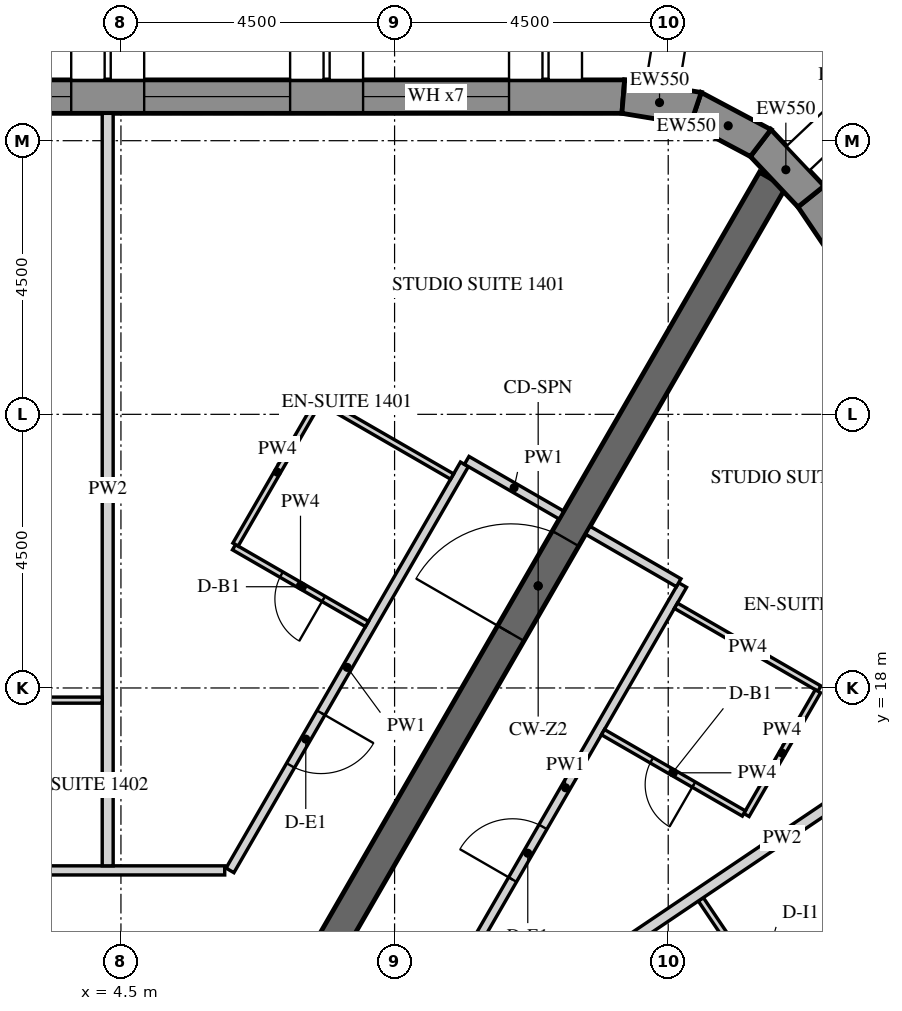
"""IFC4 building model, lengths in metres.
Left out: names, types, materials, properties, quantities, classifications, styles, units other than length and angle.
Written with IfcOpenShell. Run it as: python <this file> out.ifc"""

import sys

from ifc_helpers import new_model, si_unit, direction, frame, frame_2d, origin, place, context, subcontext, project, spatial, polyline, rectangle, outline, extrude, element, fill, save


model = new_model("IFC4")
c1 = context("Model", 3, precision=1e-05, world=origin(), true_north=direction((0.0, 1.0)))
c2 = subcontext(c1, "Body", "Model", "MODEL_VIEW")
j1 = project(units=[si_unit("LENGTHUNIT", "METRE"), si_unit("PLANEANGLEUNIT", "RADIAN")], contexts=[c1])
p1 = place(None, origin())
s1 = spatial("IfcSite", under=j1, at=p1, CompositionType="ELEMENT")
p2 = place(p1, origin())
s2 = spatial("IfcBuilding", under=s1, at=p2, CompositionType="ELEMENT")
p3 = place(p2, frame((0.0, 0.0, 183.9)))
s3 = spatial("IfcBuildingStorey", under=s2, at=p3, CompositionType="ELEMENT", Elevation=183.9)
p4 = place(p3, frame((12.761, 27.725, -0.15), z_axis=(0.0, 0.0, 1.0), x_axis=(-1.0, 0.0, 0.0)))
e1 = element("IfcWall", 1, at=p4, inside=s3, PredefinedType="SOLIDWALL", context=c2, shape_type="SweptSolid", body=[
    extrude(outline(polyline([(-0.022, -0.275), (27.783, -0.275), (27.732, 0.275), (0.022, 0.275), (-0.022, -0.275)])), origin(), (0.0, 0.0, 1.0), 3.9),
])
p5 = place(p4, frame((1.879, 0.0, 1.05)))
e2 = element("IfcOpeningElement", 2, at=p5, cuts=e1, PredefinedType="OPENING", context=c2, shape_type="SweptSolid", body=[
    extrude(rectangle(XDim=2.4, YDim=2.4, at=frame_2d((1.2, 1.2))), frame((0.0, 0.285, 0.0), z_axis=(0.0, -1.0, 0.0), x_axis=(1.0, 0.0, 0.0)), (0.0, 0.0, 1.0), 0.57),
])
p6 = place(p4, frame((5.479, 0.0, 1.05)))
e3 = element("IfcOpeningElement", 3, at=p6, cuts=e1, PredefinedType="OPENING", context=c2, shape_type="SweptSolid", body=[
    extrude(rectangle(XDim=2.4, YDim=2.4, at=frame_2d((1.2, 1.2))), frame((0.0, 0.285, 0.0), z_axis=(0.0, -1.0, 0.0), x_axis=(1.0, 0.0, 0.0)), (0.0, 0.0, 1.0), 0.57),
])
p7 = place(p4, frame((9.079, 0.0, 1.05)))
e4 = element("IfcOpeningElement", 4, at=p7, cuts=e1, PredefinedType="OPENING", context=c2, shape_type="SweptSolid", body=[
    extrude(rectangle(XDim=2.4, YDim=2.4, at=frame_2d((1.2, 1.2))), frame((0.0, 0.285, 0.0), z_axis=(0.0, -1.0, 0.0), x_axis=(1.0, 0.0, 0.0)), (0.0, 0.0, 1.0), 0.57),
])
p8 = place(p4, frame((12.679, 0.0, 1.05)))
e5 = element("IfcOpeningElement", 5, at=p8, cuts=e1, PredefinedType="OPENING", context=c2, shape_type="SweptSolid", body=[
    extrude(rectangle(XDim=2.4, YDim=2.4, at=frame_2d((1.2, 1.2))), frame((0.0, 0.285, 0.0), z_axis=(0.0, -1.0, 0.0), x_axis=(1.0, 0.0, 0.0)), (0.0, 0.0, 1.0), 0.57),
])
p9 = place(p4, frame((16.279, 0.0, 1.05)))
e6 = element("IfcOpeningElement", 6, at=p9, cuts=e1, PredefinedType="OPENING", context=c2, shape_type="SweptSolid", body=[
    extrude(rectangle(XDim=2.4, YDim=2.4, at=frame_2d((1.2, 1.2))), frame((0.0, 0.285, 0.0), z_axis=(0.0, -1.0, 0.0), x_axis=(1.0, 0.0, 0.0)), (0.0, 0.0, 1.0), 0.57),
])
p10 = place(p4, frame((19.879, 0.0, 1.05)))
e7 = element("IfcOpeningElement", 7, at=p10, cuts=e1, PredefinedType="OPENING", context=c2, shape_type="SweptSolid", body=[
    extrude(rectangle(XDim=2.4, YDim=2.4, at=frame_2d((1.2, 1.2))), frame((0.0, 0.285, 0.0), z_axis=(0.0, -1.0, 0.0), x_axis=(1.0, 0.0, 0.0)), (0.0, 0.0, 1.0), 0.57),
])
p11 = place(p4, frame((23.479, 0.0, 1.05)))
e8 = element("IfcOpeningElement", 8, at=p11, cuts=e1, PredefinedType="OPENING", context=c2, shape_type="SweptSolid", body=[
    extrude(rectangle(XDim=2.4, YDim=2.4, at=frame_2d((1.2, 1.2))), frame((0.0, 0.285, 0.0), z_axis=(0.0, -1.0, 0.0), x_axis=(1.0, 0.0, 0.0)), (0.0, 0.0, 1.0), 0.57),
])
p12 = place(p3, frame((31.371, 3.071, -0.15), z_axis=(0.0, 0.0, 1.0), x_axis=(-0.559189891278, 0.829039604297, 0.0)))
e9 = element("IfcWall", 9, at=p12, inside=s3, PredefinedType="SOLIDWALL", context=c2, shape_type="SweptSolid", body=[
    extrude(outline(polyline([(-0.026, -0.275), (27.781, -0.275), (27.736, 0.275), (0.026, 0.275), (-0.026, -0.275)])), origin(), (0.0, 0.0, 1.0), 3.9),
])
p13 = place(p12, frame((1.879, 0.0, 1.05)))
e10 = element("IfcOpeningElement", 10, at=p13, cuts=e9, PredefinedType="OPENING", context=c2, shape_type="SweptSolid", body=[
    extrude(rectangle(XDim=2.4, YDim=2.4, at=frame_2d((1.2, 1.2))), frame((0.0, 0.285, 0.0), z_axis=(0.0, -1.0, 0.0), x_axis=(1.0, 0.0, 0.0)), (0.0, 0.0, 1.0), 0.57),
])
p14 = place(p12, frame((5.479, 0.0, 1.05)))
e11 = element("IfcOpeningElement", 11, at=p14, cuts=e9, PredefinedType="OPENING", context=c2, shape_type="SweptSolid", body=[
    extrude(rectangle(XDim=2.4, YDim=2.4, at=frame_2d((1.2, 1.2))), frame((0.0, 0.285, 0.0), z_axis=(0.0, -1.0, 0.0), x_axis=(1.0, 0.0, 0.0)), (0.0, 0.0, 1.0), 0.57),
])
p15 = place(p12, frame((9.079, 0.0, 1.05)))
e12 = element("IfcOpeningElement", 12, at=p15, cuts=e9, PredefinedType="OPENING", context=c2, shape_type="SweptSolid", body=[
    extrude(rectangle(XDim=2.4, YDim=2.4, at=frame_2d((1.2, 1.2))), frame((0.0, 0.285, 0.0), z_axis=(0.0, -1.0, 0.0), x_axis=(1.0, 0.0, 0.0)), (0.0, 0.0, 1.0), 0.57),
])
p16 = place(p12, frame((12.679, 0.0, 1.05)))
e13 = element("IfcOpeningElement", 13, at=p16, cuts=e9, PredefinedType="OPENING", context=c2, shape_type="SweptSolid", body=[
    extrude(rectangle(XDim=2.4, YDim=2.4, at=frame_2d((1.2, 1.2))), frame((0.0, 0.285, 0.0), z_axis=(0.0, -1.0, 0.0), x_axis=(1.0, 0.0, 0.0)), (0.0, 0.0, 1.0), 0.57),
])
p17 = place(p12, frame((16.279, 0.0, 1.05)))
e14 = element("IfcOpeningElement", 14, at=p17, cuts=e9, PredefinedType="OPENING", context=c2, shape_type="SweptSolid", body=[
    extrude(rectangle(XDim=2.4, YDim=2.4, at=frame_2d((1.2, 1.2))), frame((0.0, 0.285, 0.0), z_axis=(0.0, -1.0, 0.0), x_axis=(1.0, 0.0, 0.0)), (0.0, 0.0, 1.0), 0.57),
])
p18 = place(p12, frame((19.879, 0.0, 1.05)))
e15 = element("IfcOpeningElement", 15, at=p18, cuts=e9, PredefinedType="OPENING", context=c2, shape_type="SweptSolid", body=[
    extrude(rectangle(XDim=2.4, YDim=2.4, at=frame_2d((1.2, 1.2))), frame((0.0, 0.285, 0.0), z_axis=(0.0, -1.0, 0.0), x_axis=(1.0, 0.0, 0.0)), (0.0, 0.0, 1.0), 0.57),
])
p19 = place(p12, frame((23.479, 0.0, 1.05)))
e16 = element("IfcOpeningElement", 16, at=p19, cuts=e9, PredefinedType="OPENING", context=c2, shape_type="SweptSolid", body=[
    extrude(rectangle(XDim=2.4, YDim=2.4, at=frame_2d((1.2, 1.2))), frame((0.0, 0.285, 0.0), z_axis=(0.0, -1.0, 0.0), x_axis=(1.0, 0.0, 0.0)), (0.0, 0.0, 1.0), 0.57),
])
p20 = place(p3, frame((15.849, 26.083, -0.15), z_axis=(0.0, 0.0, 1.0), x_axis=(-0.686196220404, 0.727416488061, 0.0)))
e17 = element("IfcWall", 17, at=p20, inside=s3, PredefinedType="SOLIDWALL", context=c2, shape_type="SweptSolid", body=[
    extrude(outline(polyline([(-0.022, -0.275), (1.253, -0.275), (1.163, 0.275), (0.022, 0.275), (-0.022, -0.275)])), origin(), (0.0, 0.0, 1.0), 3.9),
])
p21 = place(p3, frame((15.02, 26.962, -0.15), z_axis=(0.0, 0.0, 1.0), x_axis=(-0.882950818639, 0.469465495926, 0.0)))
e18 = element("IfcWall", 18, at=p21, inside=s3, PredefinedType="SOLIDWALL", context=c2, shape_type="SweptSolid", body=[
    extrude(outline(polyline([(-0.045, -0.275), (1.253, -0.275), (1.163, 0.275), (0.045, 0.275), (-0.045, -0.275)])), origin(), (0.0, 0.0, 1.0), 3.9),
])
p22 = place(p3, frame((13.953, 27.529, -0.15), z_axis=(0.0, 0.0, 1.0), x_axis=(-0.986751945211, 0.162236243244, 0.0)))
e19 = element("IfcWall", 19, at=p22, inside=s3, PredefinedType="SOLIDWALL", context=c2, shape_type="SweptSolid", body=[
    extrude(outline(polyline([(-0.045, -0.275), (1.231, -0.275), (1.186, 0.275), (0.045, 0.275), (-0.045, -0.275)])), origin(), (0.0, 0.0, 1.0), 3.9),
])
p23 = place(p3, frame((7.506, 13.0, -0.15), z_axis=(0.0, 0.0, 1.0), x_axis=(0.499988271576, 0.866032175087, 0.0)))
e20 = element("IfcWall", 20, at=p23, inside=s3, PredefinedType="SHEAR", context=c2, shape_type="SweptSolid", body=[
    extrude(rectangle(XDim=15.424, YDim=0.5, at=frame_2d((7.712, 0.0))), origin(), (0.0, 0.0, 1.0), 3.9),
])
p24 = place(p23, frame((6.812, 0.0, 0.15)))
e21 = element("IfcOpeningElement", 21, at=p24, cuts=e20, PredefinedType="OPENING", context=c2, shape_type="SweptSolid", body=[
    extrude(rectangle(XDim=1.8, YDim=2.4, at=frame_2d((0.9, 1.2))), frame((0.0, 0.26, 0.0), z_axis=(0.0, -1.0, 0.0), x_axis=(1.0, 0.0, 0.0)), (0.0, 0.0, 1.0), 0.52),
])
p25 = place(p3, frame((10.149, 21.678, 0.0), z_axis=(0.0, 0.0, 1.0), x_axis=(-0.499993780622, -0.866028994514, 0.0)))
e22 = element("IfcWall", 22, at=p25, inside=s3, PredefinedType="PARTITIONING", context=c2, shape_type="SweptSolid", body=[
    extrude(rectangle(XDim=7.711, YDim=0.15, at=frame_2d((3.855, 0.0))), origin(), (0.0, 0.0, 1.0), 2.988),
])
p26 = place(p25, frame((4.718, 0.0, 0.0)))
e23 = element("IfcOpeningElement", 23, at=p26, cuts=e22, PredefinedType="OPENING", context=c2, shape_type="SweptSolid", body=[
    extrude(rectangle(XDim=1.0, YDim=2.1, at=frame_2d((0.5, 1.05))), frame((0.0, 0.085, 0.0), z_axis=(0.0, -1.0, 0.0), x_axis=(1.0, 0.0, 0.0)), (0.0, 0.0, 1.0), 0.17),
])
p27 = place(p3, frame((6.207, 15.0, 0.0), z_axis=(0.0, 0.0, 1.0), x_axis=(-1.0, 0.0, 0.0)))
e24 = element("IfcWall", 24, at=p27, inside=s3, PredefinedType="PARTITIONING", context=c2, shape_type="SweptSolid", body=[
    extrude(rectangle(XDim=14.867, YDim=0.15, at=frame_2d((7.433, 0.0))), origin(), (0.0, 0.0, 1.0), 2.988),
])
p28 = place(p27, frame((8.224, 0.0, 0.0)))
e25 = element("IfcOpeningElement", 25, at=p28, cuts=e24, PredefinedType="OPENING", context=c2, shape_type="SweptSolid", body=[
    extrude(rectangle(XDim=1.0, YDim=2.1, at=frame_2d((0.5, 1.05))), frame((0.0, 0.085, 0.0), z_axis=(0.0, -1.0, 0.0), x_axis=(1.0, 0.0, 0.0)), (0.0, 0.0, 1.0), 0.17),
])
p29 = place(p27, frame((13.717, 0.0, 0.0)))
e26 = element("IfcOpeningElement", 26, at=p29, cuts=e24, PredefinedType="OPENING", context=c2, shape_type="SweptSolid", body=[
    extrude(rectangle(XDim=1.0, YDim=2.1, at=frame_2d((0.5, 1.05))), frame((0.0, 0.085, 0.0), z_axis=(0.0, -1.0, 0.0), x_axis=(1.0, 0.0, 0.0)), (0.0, 0.0, 1.0), 0.17),
])
p30 = place(p3, frame((11.745, 20.843, 0.0), z_axis=(0.0, 0.0, 1.0), x_axis=(-0.865989075817, 0.500062916607, 0.0)))
e27 = element("IfcWall", 27, at=p30, inside=s3, PredefinedType="PARTITIONING", context=c2, shape_type="SweptSolid", body=[
    extrude(rectangle(XDim=1.8, YDim=0.15, at=frame_2d((0.9, 0.0))), origin(), (0.0, 0.0, 1.0), 2.988),
])
p31 = place(p3, frame((9.887, 13.025, 0.0), z_axis=(0.0, 0.0, 1.0), x_axis=(0.499985955615, 0.866033512162, 0.0)))
e28 = element("IfcWall", 28, at=p31, inside=s3, PredefinedType="PARTITIONING", context=c2, shape_type="SweptSolid", body=[
    extrude(rectangle(XDim=7.699, YDim=0.15, at=frame_2d((3.85, 0.0))), origin(), (0.0, 0.0, 1.0), 2.988),
])
p32 = place(p31, frame((2.106, 0.0, 0.0)))
e29 = element("IfcOpeningElement", 29, at=p32, cuts=e28, PredefinedType="OPENING", context=c2, shape_type="SweptSolid", body=[
    extrude(rectangle(XDim=1.0, YDim=2.1, at=frame_2d((0.5, 1.05))), frame((0.0, 0.085, 0.0), z_axis=(0.0, -1.0, 0.0), x_axis=(1.0, 0.0, 0.0)), (0.0, 0.0, 1.0), 0.17),
])
p33 = place(p3, frame((13.672, 19.73, 0.0), z_axis=(0.0, 0.0, 1.0), x_axis=(-0.866074815912, 0.499914405916, 0.0)))
e30 = element("IfcWall", 30, at=p33, inside=s3, PredefinedType="PARTITIONING", context=c2, shape_type="SweptSolid", body=[
    extrude(rectangle(XDim=1.725, YDim=0.15, at=frame_2d((0.862, 0.0))), origin(), (0.0, 0.0, 1.0), 2.988),
])
p34 = place(p3, frame((8.546, 19.052, 0.0), z_axis=(0.0, 0.0, 1.0), x_axis=(-0.866039067339, 0.499976333282, 0.0)))
e31 = element("IfcWall", 31, at=p34, inside=s3, PredefinedType="PARTITIONING", context=c2, shape_type="SweptSolid", body=[
    extrude(rectangle(XDim=2.525, YDim=0.1, at=frame_2d((1.262, 0.0))), origin(), (0.0, 0.0, 1.0), 2.988),
])
p35 = place(p34, frame((0.825, 0.0, 0.0)))
e32 = element("IfcOpeningElement", 32, at=p35, cuts=e31, PredefinedType="OPENING", context=c2, shape_type="SweptSolid", body=[
    extrude(rectangle(XDim=0.8, YDim=2.1, at=frame_2d((0.4, 1.05))), frame((0.0, 0.06, 0.0), z_axis=(0.0, -1.0, 0.0), x_axis=(1.0, 0.0, 0.0)), (0.0, 0.0, 1.0), 0.12),
])
p36 = place(p3, frame((6.385, 20.358, 0.0), z_axis=(0.0, 0.0, 1.0), x_axis=(0.499996545922, 0.866027397988, 0.0)))
e33 = element("IfcWall", 33, at=p36, inside=s3, PredefinedType="PARTITIONING", context=c2, shape_type="SweptSolid", body=[
    extrude(rectangle(XDim=2.75, YDim=0.1, at=frame_2d((1.375, 0.0))), origin(), (0.0, 0.0, 1.0), 2.988),
])
p37 = place(p3, frame((7.803, 22.715, 0.0), z_axis=(0.0, 0.0, 1.0), x_axis=(0.866006523861, -0.500032699561, 0.0)))
e34 = element("IfcWall", 34, at=p37, inside=s3, PredefinedType="PARTITIONING", context=c2, shape_type="SweptSolid", body=[
    extrude(rectangle(XDim=2.475, YDim=0.1, at=frame_2d((1.237, 0.0))), origin(), (0.0, 0.0, 1.0), 2.988),
])
p38 = place(p3, frame((4.282, 27.45, 0.0), z_axis=(0.0, 0.0, 1.0), x_axis=(0.0, -1.0, 0.0)))
e35 = element("IfcWall", 35, at=p38, inside=s3, PredefinedType="PARTITIONING", context=c2, shape_type="SweptSolid", body=[
    extrude(rectangle(XDim=12.375, YDim=0.18, at=frame_2d((6.188, 0.0))), origin(), (0.0, 0.0, 1.0), 2.988),
])
p39 = place(p3, frame((1.532, 17.8, 0.0), z_axis=(0.0, 0.0, 1.0), x_axis=(1.0, 0.0, 0.0)))
e36 = element("IfcWall", 36, at=p39, inside=s3, PredefinedType="PARTITIONING", context=c2, shape_type="SweptSolid", body=[
    extrude(rectangle(XDim=2.66, YDim=0.1, at=frame_2d((1.33, 0.0))), origin(), (0.0, 0.0, 1.0), 2.988),
])
p40 = place(p3, frame((22.376, 15.915, 0.0), z_axis=(0.0, 0.0, 1.0), x_axis=(-0.829044752643, -0.559182258406, 0.0)))
e37 = element("IfcWall", 37, at=p40, inside=s3, PredefinedType="PARTITIONING", context=c2, shape_type="SweptSolid", body=[
    extrude(rectangle(XDim=7.692, YDim=0.1, at=frame_2d((3.846, 0.0))), origin(), (0.0, 0.0, 1.0), 2.988),
])
p41 = place(p3, frame((15.971, 11.656, 0.0), z_axis=(0.0, 0.0, 1.0), x_axis=(-0.559202575539, 0.829031048581, 0.0)))
e38 = element("IfcWall", 38, at=p41, inside=s3, PredefinedType="PARTITIONING", context=c2, shape_type="SweptSolid", body=[
    extrude(rectangle(XDim=3.46, YDim=0.1, at=frame_2d((1.73, 0.0))), origin(), (0.0, 0.0, 1.0), 2.988),
])
p42 = place(p41, frame((1.3, 0.0, 0.0)))
e39 = element("IfcOpeningElement", 39, at=p42, cuts=e38, PredefinedType="OPENING", context=c2, shape_type="SweptSolid", body=[
    extrude(rectangle(XDim=0.9, YDim=2.1, at=frame_2d((0.45, 1.05))), frame((0.0, 0.06, 0.0), z_axis=(0.0, -1.0, 0.0), x_axis=(1.0, 0.0, 0.0)), (0.0, 0.0, 1.0), 0.12),
])
p43 = place(p3, frame((20.363, 18.9, 0.0), z_axis=(0.0, 0.0, 1.0), x_axis=(-0.829027307641, -0.559208121531, 0.0)))
e40 = element("IfcWall", 40, at=p43, inside=s3, PredefinedType="PARTITIONING", context=c2, shape_type="SweptSolid", body=[
    extrude(rectangle(XDim=12.039, YDim=0.18, at=frame_2d((6.02, 0.0))), origin(), (0.0, 0.0, 1.0), 2.988),
])
p44 = place(p3, frame((13.627, 19.352, 0.0), z_axis=(0.0, 0.0, 1.0), x_axis=(0.866012511928, -0.500022328685, 0.0)))
e41 = element("IfcWall", 41, at=p44, inside=s3, PredefinedType="PARTITIONING", context=c2, shape_type="SweptSolid", body=[
    extrude(rectangle(XDim=2.725, YDim=0.1, at=frame_2d((1.363, 0.0))), origin(), (0.0, 0.0, 1.0), 2.988),
])
p45 = place(p3, frame((15.962, 17.947, 0.0), z_axis=(0.0, 0.0, 1.0), x_axis=(-0.500016218704, -0.866016039709, 0.0)))
e42 = element("IfcWall", 42, at=p45, inside=s3, PredefinedType="PARTITIONING", context=c2, shape_type="SweptSolid", body=[
    extrude(rectangle(XDim=2.35, YDim=0.1, at=frame_2d((1.175, 0.0))), origin(), (0.0, 0.0, 1.0), 2.988),
])
p46 = place(p3, frame((14.743, 15.936, 0.0), z_axis=(0.0, 0.0, 1.0), x_axis=(-0.86604424267, 0.499967368674, 0.0)))
e43 = element("IfcWall", 43, at=p46, inside=s3, PredefinedType="PARTITIONING", context=c2, shape_type="SweptSolid", body=[
    extrude(rectangle(XDim=2.675, YDim=0.1, at=frame_2d((1.337, 0.0))), origin(), (0.0, 0.0, 1.0), 2.988),
])
p47 = place(p46, frame((0.95, 0.0, 0.0)))
e44 = element("IfcOpeningElement", 44, at=p47, cuts=e43, PredefinedType="OPENING", context=c2, shape_type="SweptSolid", body=[
    extrude(rectangle(XDim=0.8, YDim=2.1, at=frame_2d((0.4, 1.05))), frame((0.0, 0.06, 0.0), z_axis=(0.0, -1.0, 0.0), x_axis=(1.0, 0.0, 0.0)), (0.0, 0.0, 1.0), 0.12),
])
p48 = place(p5, frame((0.0, 0.205, 0.0)))
e45 = element("IfcWindow", 45, at=p48, inside=s3, PartitioningType="DOUBLE_PANEL_VERTICAL", PredefinedType="WINDOW", context=c2, shape_type="SweptSolid", body=[
    extrude(rectangle(XDim=2.4, YDim=2.4, at=frame_2d((1.2, 1.2))), frame((0.0, 0.03, 0.0), z_axis=(0.0, -1.0, 0.0), x_axis=(1.0, 0.0, 0.0)), (0.0, 0.0, 1.0), 0.06),
])
fill(e2, e45)
p49 = place(p6, frame((0.0, 0.205, 0.0)))
e46 = element("IfcWindow", 46, at=p49, inside=s3, PartitioningType="DOUBLE_PANEL_VERTICAL", PredefinedType="WINDOW", context=c2, shape_type="SweptSolid", body=[
    extrude(rectangle(XDim=2.4, YDim=2.4, at=frame_2d((1.2, 1.2))), frame((0.0, 0.03, 0.0), z_axis=(0.0, -1.0, 0.0), x_axis=(1.0, 0.0, 0.0)), (0.0, 0.0, 1.0), 0.06),
])
fill(e3, e46)
p50 = place(p7, frame((0.0, 0.205, 0.0)))
e47 = element("IfcWindow", 47, at=p50, inside=s3, PartitioningType="DOUBLE_PANEL_VERTICAL", PredefinedType="WINDOW", context=c2, shape_type="SweptSolid", body=[
    extrude(rectangle(XDim=2.4, YDim=2.4, at=frame_2d((1.2, 1.2))), frame((0.0, 0.03, 0.0), z_axis=(0.0, -1.0, 0.0), x_axis=(1.0, 0.0, 0.0)), (0.0, 0.0, 1.0), 0.06),
])
fill(e4, e47)
p51 = place(p24, origin())
e48 = element("IfcDoor", 48, at=p51, inside=s3, OperationType="DOUBLE_DOOR_SINGLE_SWING", PredefinedType="DOOR", context=c2, shape_type="SweptSolid", body=[
    extrude(rectangle(XDim=1.8, YDim=2.4, at=frame_2d((0.9, 1.2))), frame((0.0, 0.025, 0.0), z_axis=(0.0, -1.0, 0.0), x_axis=(1.0, 0.0, 0.0)), (0.0, 0.0, 1.0), 0.05),
])
fill(e21, e48)
p52 = place(p26, origin())
e49 = element("IfcDoor", 49, at=p52, inside=s3, OperationType="SINGLE_SWING_LEFT", PredefinedType="DOOR", context=c2, shape_type="SweptSolid", body=[
    extrude(rectangle(XDim=1.0, YDim=2.1, at=frame_2d((0.5, 1.05))), frame((0.0, 0.025, 0.0), z_axis=(0.0, -1.0, 0.0), x_axis=(1.0, 0.0, 0.0)), (0.0, 0.0, 1.0), 0.05),
])
fill(e23, e49)
p53 = place(p35, origin())
e50 = element("IfcDoor", 50, at=p53, inside=s3, OperationType="SINGLE_SWING_RIGHT", PredefinedType="DOOR", context=c2, shape_type="SweptSolid", body=[
    extrude(rectangle(XDim=0.8, YDim=2.1, at=frame_2d((0.4, 1.05))), frame((0.0, 0.025, 0.0), z_axis=(0.0, -1.0, 0.0), x_axis=(1.0, 0.0, 0.0)), (0.0, 0.0, 1.0), 0.05),
])
fill(e32, e50)
p54 = place(p32, origin())
e51 = element("IfcDoor", 51, at=p54, inside=s3, OperationType="SINGLE_SWING_RIGHT", PredefinedType="DOOR", context=c2, shape_type="SweptSolid", body=[
    extrude(rectangle(XDim=1.0, YDim=2.1, at=frame_2d((0.5, 1.05))), frame((0.0, 0.025, 0.0), z_axis=(0.0, -1.0, 0.0), x_axis=(1.0, 0.0, 0.0)), (0.0, 0.0, 1.0), 0.05),
])
fill(e29, e51)
p55 = place(p47, origin())
e52 = element("IfcDoor", 52, at=p55, inside=s3, OperationType="SINGLE_SWING_RIGHT", PredefinedType="DOOR", context=c2, shape_type="SweptSolid", body=[
    extrude(rectangle(XDim=0.8, YDim=2.1, at=frame_2d((0.4, 1.05))), frame((0.0, 0.025, 0.0), z_axis=(0.0, -1.0, 0.0), x_axis=(1.0, 0.0, 0.0)), (0.0, 0.0, 1.0), 0.05),
])
fill(e44, e52)
save(model, sys.argv[1])
